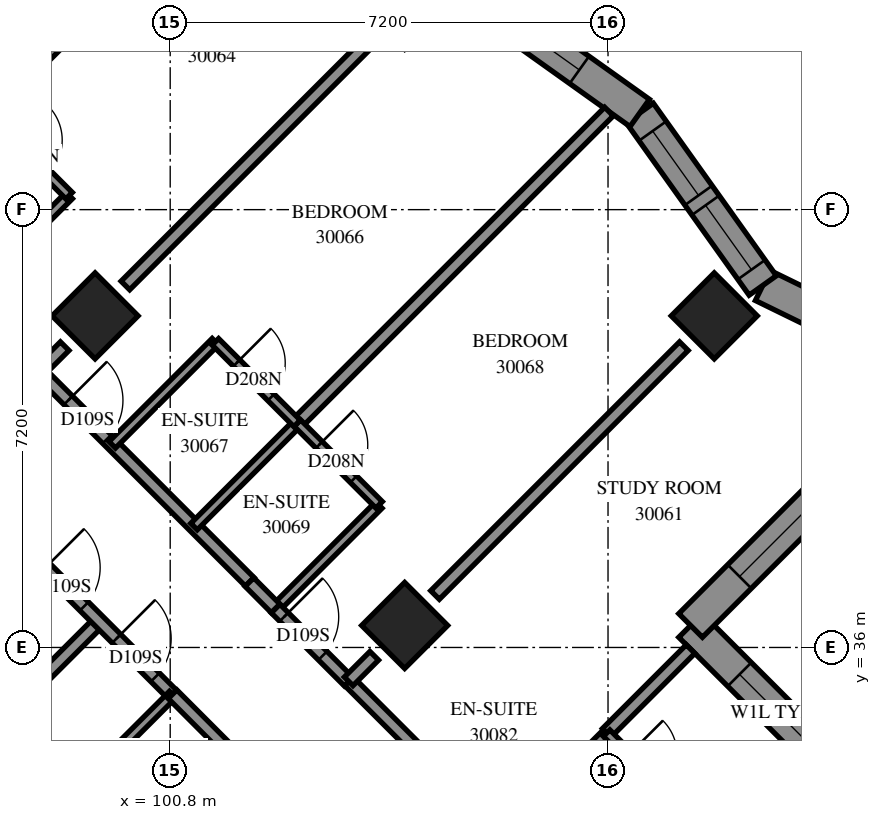
"""IFC4 building model, lengths in metres.
Left out: names, types, materials, properties, quantities, classifications, styles, units other than length and angle.
Written with IfcOpenShell. Run it as: python <this file> out.ifc"""

import sys

from ifc_helpers import new_model, si_unit, direction, frame, frame_2d, origin, origin_2d, place, context, subcontext, project, spatial, polyline, rectangle, outline, extrude, element, fill, save


model = new_model("IFC4")
c1 = context("Model", 3, precision=1e-05, world=origin(), true_north=direction((0.0, 1.0)))
c2 = subcontext(c1, "Body", "Model", "MODEL_VIEW")
j1 = project(units=[si_unit("LENGTHUNIT", "METRE"), si_unit("PLANEANGLEUNIT", "RADIAN")], contexts=[c1])
p1 = place(None, origin())
s1 = spatial("IfcSite", under=j1, at=p1, CompositionType="ELEMENT")
p2 = place(p1, origin())
s2 = spatial("IfcBuilding", under=s1, at=p2, CompositionType="ELEMENT")
p3 = place(p2, frame((0.0, 0.0, 111.8)))
s3 = spatial("IfcBuildingStorey", under=s2, at=p3, CompositionType="ELEMENT", Elevation=111.8)
for number, where, z_axis, x_axis in (
    (1, (99.565, 41.453, 0.0), (0.0, 0.0, 1.0), (0.707, -0.707, 0.0)),
    (2, (109.747, 41.453, 0.0), (0.0, 0.0, 1.0), (0.707, -0.707, 0.0)),
    (3, (104.656, 36.362, 0.0), (0.0, 0.0, 1.0), (0.707, -0.707, 0.0)),
):
    element("IfcColumn", number, at=place(p3, frame(where, z_axis=z_axis, x_axis=x_axis)), inside=s3, PredefinedType="COLUMN", context=c2, shape_type="SweptSolid", body=[
        extrude(rectangle(XDim=1.0, YDim=1.0, at=origin_2d()), origin(), (0.0, 0.0, 1.0), 3.1),
    ])
p4 = place(p3, frame((112.823, 32.897, 0.0), z_axis=(0.0, 0.0, 1.0), x_axis=(-0.7071067812, 0.7071067812, 0.0)))
e4 = element("IfcWall", 4, at=p4, inside=s3, PredefinedType="SOLIDWALL", context=c2, shape_type="SweptSolid", body=[
    extrude(outline(polyline([(-0.174, -0.275), (4.626, -0.275), (5.176, 0.275), (0.174, 0.275), (-0.174, -0.275)])), origin(), (0.0, 0.0, 1.0), 3.1),
])
p5 = place(p4, frame((1.963, 0.0, 0.6)))
e5 = element("IfcOpeningElement", 5, at=p5, cuts=e4, PredefinedType="OPENING", context=c2, shape_type="SweptSolid", body=[
    extrude(rectangle(XDim=1.8, YDim=1.9, at=frame_2d((0.9, 0.95))), frame((0.0, 0.285, 0.0), z_axis=(0.0, -1.0, 0.0), x_axis=(1.0, 0.0, 0.0)), (0.0, 0.0, 1.0), 0.57),
])
p6 = place(p3, frame((109.358, 36.362, 0.0), z_axis=(0.0, 0.0, 1.0), x_axis=(0.7071067812, 0.7071067812, 0.0)))
e6 = element("IfcWall", 6, at=p6, inside=s3, PredefinedType="SOLIDWALL", context=c2, shape_type="SweptSolid", body=[
    extrude(outline(polyline([(0.275, -0.275), (6.247, -0.275), (5.477, 0.275), (-0.275, 0.275), (0.275, -0.275)])), origin(), (0.0, 0.0, 1.0), 3.1),
])
p7 = place(p6, frame((1.137, 0.0, 0.6)))
e7 = element("IfcOpeningElement", 7, at=p7, cuts=e6, PredefinedType="OPENING", context=c2, shape_type="SweptSolid", body=[
    extrude(rectangle(XDim=1.8, YDim=1.9, at=frame_2d((0.9, 0.95))), frame((0.0, 0.285, 0.0), z_axis=(0.0, -1.0, 0.0), x_axis=(1.0, 0.0, 0.0)), (0.0, 0.0, 1.0), 0.57),
])
p8 = place(p6, frame((3.976, 0.0, 0.6)))
e8 = element("IfcOpeningElement", 8, at=p8, cuts=e6, PredefinedType="OPENING", context=c2, shape_type="SweptSolid", body=[
    extrude(rectangle(XDim=1.2, YDim=1.9, at=frame_2d((0.6, 0.95))), frame((0.0, 0.285, 0.0), z_axis=(0.0, -1.0, 0.0), x_axis=(1.0, 0.0, 0.0)), (0.0, 0.0, 1.0), 0.57),
])
p9 = place(p3, frame((113.503, 40.507, 0.0), z_axis=(0.0, 0.0, 1.0), x_axis=(-0.8984293541, 0.4391180887, 0.0)))
e9 = element("IfcWall", 9, at=p9, inside=s3, PredefinedType="SOLIDWALL", context=c2, shape_type="SweptSolid", body=[
    extrude(outline(polyline([(-0.385, -0.275), (3.224, -0.275), (3.363, 0.275), (0.385, 0.275), (-0.385, -0.275)])), origin(), (0.0, 0.0, 1.0), 3.1),
])
p10 = place(p9, frame((1.239, 0.0, 0.5)))
e10 = element("IfcOpeningElement", 10, at=p10, cuts=e9, PredefinedType="OPENING", context=c2, shape_type="SweptSolid", body=[
    extrude(rectangle(XDim=1.2, YDim=2.45, at=frame_2d((0.6, 1.225))), frame((0.0, 0.285, 0.0), z_axis=(0.0, -1.0, 0.0), x_axis=(1.0, 0.0, 0.0)), (0.0, 0.0, 1.0), 0.57),
])
p11 = place(p3, frame((110.544, 41.953, 0.0), z_axis=(0.0, 0.0, 1.0), x_axis=(-0.5805022438, 0.8142586474, 0.0)))
e11 = element("IfcWall", 11, at=p11, inside=s3, PredefinedType="SOLIDWALL", context=c2, shape_type="SweptSolid", body=[
    extrude(outline(polyline([(0.07, -0.275), (3.53, -0.275), (3.438, 0.275), (-0.07, 0.275), (0.07, -0.275)])), origin(), (0.0, 0.0, 1.0), 3.1),
])
p12 = place(p11, frame((0.319, 0.0, 0.5)))
e12 = element("IfcOpeningElement", 12, at=p12, cuts=e11, PredefinedType="OPENING", context=c2, shape_type="SweptSolid", body=[
    extrude(rectangle(XDim=1.3, YDim=2.45, at=frame_2d((0.65, 1.225))), frame((0.0, 0.285, 0.0), z_axis=(0.0, -1.0, 0.0), x_axis=(1.0, 0.0, 0.0)), (0.0, 0.0, 1.0), 0.57),
])
p13 = place(p11, frame((1.819, 0.0, 0.5)))
e13 = element("IfcOpeningElement", 13, at=p13, cuts=e11, PredefinedType="OPENING", context=c2, shape_type="SweptSolid", body=[
    extrude(rectangle(XDim=1.3, YDim=2.45, at=frame_2d((0.65, 1.225))), frame((0.0, 0.285, 0.0), z_axis=(0.0, -1.0, 0.0), x_axis=(1.0, 0.0, 0.0)), (0.0, 0.0, 1.0), 0.57),
])
p14 = place(p3, frame((108.522, 44.79, 0.0), z_axis=(0.0, 0.0, 1.0), x_axis=(-0.8142544581, 0.5805081201, 0.0)))
e14 = element("IfcWall", 14, at=p14, inside=s3, PredefinedType="SOLIDWALL", context=c2, shape_type="SweptSolid", body=[
    extrude(outline(polyline([(-0.046, -0.275), (3.414, -0.275), (3.507, 0.275), (0.046, 0.275), (-0.046, -0.275)])), origin(), (0.0, 0.0, 1.0), 3.1),
])
p15 = place(p14, frame((1.22, 0.0, 0.5)))
e15 = element("IfcOpeningElement", 15, at=p15, cuts=e14, PredefinedType="OPENING", context=c2, shape_type="SweptSolid", body=[
    extrude(rectangle(XDim=1.2, YDim=2.45, at=frame_2d((0.6, 1.225))), frame((0.0, 0.285, 0.0), z_axis=(0.0, -1.0, 0.0), x_axis=(1.0, 0.0, 0.0)), (0.0, 0.0, 1.0), 0.57),
])
p16 = place(p3, frame((91.452, 28.25, 0.0), z_axis=(0.0, 0.0, 1.0), x_axis=(0.7071931897, 0.7070203621, 0.0)))
e16 = element("IfcWall", 16, at=p16, inside=s3, PredefinedType="PARTITIONING", context=c2, shape_type="SweptSolid", body=[
    extrude(rectangle(XDim=11.572, YDim=0.2, at=frame_2d((5.786, 0.0))), origin(), (0.0, 0.0, 1.0), 3.1),
])
p17 = place(p3, frame((94.047, 42.015, 0.0), z_axis=(0.0, 0.0, 1.0), x_axis=(0.7071067812, -0.7071067812, 0.0)))
e17 = element("IfcWall", 17, at=p17, inside=s3, PredefinedType="PARTITIONING", context=c2, shape_type="SweptSolid", body=[
    extrude(rectangle(XDim=9.6, YDim=0.2, at=frame_2d((4.8, 0.0))), origin(), (0.0, 0.0, 1.0), 3.1),
])
p18 = place(p17, frame((1.099, 0.0, 0.0)))
e18 = element("IfcOpeningElement", 18, at=p18, cuts=e17, PredefinedType="OPENING", context=c2, shape_type="SweptSolid", body=[
    extrude(rectangle(XDim=0.9, YDim=2.1, at=frame_2d((0.45, 1.05))), frame((0.0, 0.11, 0.0), z_axis=(0.0, -1.0, 0.0), x_axis=(1.0, 0.0, 0.0)), (0.0, 0.0, 1.0), 0.22),
])
p19 = place(p17, frame((6.649, 0.0, 0.0)))
e19 = element("IfcOpeningElement", 19, at=p19, cuts=e17, PredefinedType="OPENING", context=c2, shape_type="SweptSolid", body=[
    extrude(rectangle(XDim=0.9, YDim=2.1, at=frame_2d((0.45, 1.05))), frame((0.0, 0.11, 0.0), z_axis=(0.0, -1.0, 0.0), x_axis=(1.0, 0.0, 0.0)), (0.0, 0.0, 1.0), 0.22),
])
p20 = place(p17, frame((8.3, 0.0, 0.0)))
e20 = element("IfcOpeningElement", 20, at=p20, cuts=e17, PredefinedType="OPENING", context=c2, shape_type="SweptSolid", body=[
    extrude(rectangle(XDim=0.9, YDim=2.1, at=frame_2d((0.45, 1.05))), frame((0.0, 0.11, 0.0), z_axis=(0.0, -1.0, 0.0), x_axis=(1.0, 0.0, 0.0)), (0.0, 0.0, 1.0), 0.22),
])
p21 = place(p3, frame((96.103, 43.083, 0.0), z_axis=(0.0, 0.0, 1.0), x_axis=(0.7071067812, -0.7071067812, 0.0)))
e21 = element("IfcWall", 21, at=p21, inside=s3, PredefinedType="PARTITIONING", context=c2, shape_type="SweptSolid", body=[
    extrude(rectangle(XDim=8.491, YDim=0.2, at=frame_2d((4.245, 0.0))), origin(), (0.0, 0.0, 1.0), 3.1),
])
p22 = place(p21, frame((1.995, 0.0, 0.0)))
e22 = element("IfcOpeningElement", 22, at=p22, cuts=e21, PredefinedType="OPENING", context=c2, shape_type="SweptSolid", body=[
    extrude(rectangle(XDim=0.9, YDim=2.1, at=frame_2d((0.45, 1.05))), frame((0.0, 0.11, 0.0), z_axis=(0.0, -1.0, 0.0), x_axis=(1.0, 0.0, 0.0)), (0.0, 0.0, 1.0), 0.22),
])
p23 = place(p21, frame((4.27, 0.0, 0.0)))
e23 = element("IfcOpeningElement", 23, at=p23, cuts=e21, PredefinedType="OPENING", context=c2, shape_type="SweptSolid", body=[
    extrude(rectangle(XDim=0.9, YDim=2.1, at=frame_2d((0.45, 1.05))), frame((0.0, 0.11, 0.0), z_axis=(0.0, -1.0, 0.0), x_axis=(1.0, 0.0, 0.0)), (0.0, 0.0, 1.0), 0.22),
])
p24 = place(p3, frame((95.606, 43.577, 0.0), z_axis=(0.0, 0.0, 1.0), x_axis=(0.7071067812, 0.7071067812, 0.0)))
e24 = element("IfcWall", 24, at=p24, inside=s3, PredefinedType="PARTITIONING", context=c2, shape_type="SweptSolid", body=[
    extrude(rectangle(XDim=7.798, YDim=0.2, at=frame_2d((3.899, 0.0))), origin(), (0.0, 0.0, 1.0), 3.1),
])
p25 = place(p3, frame((102.888, 39.687, 0.0), z_axis=(0.0, 0.0, 1.0), x_axis=(0.7072515706, 0.7069619621, 0.0)))
e25 = element("IfcWall", 25, at=p25, inside=s3, PredefinedType="PARTITIONING", context=c2, shape_type="SweptSolid", body=[
    extrude(rectangle(XDim=7.251, YDim=0.2, at=frame_2d((3.626, 0.0))), origin(), (0.0, 0.0, 1.0), 3.1),
])
p26 = place(p3, frame((108.831, 30.355, 0.0), z_axis=(0.0, 0.0, 1.0), x_axis=(-0.7073012053, 0.7069123036, 0.0)))
e26 = element("IfcWall", 26, at=p26, inside=s3, PredefinedType="PARTITIONING", context=c2, shape_type="SweptSolid", body=[
    extrude(rectangle(XDim=7.2, YDim=0.2, at=frame_2d((3.6, 0.0))), origin(), (0.0, 0.0, 1.0), 3.1),
])
p27 = place(p26, frame((4.125, 0.0, 0.0)))
e27 = element("IfcOpeningElement", 27, at=p27, cuts=e26, PredefinedType="OPENING", context=c2, shape_type="SweptSolid", body=[
    extrude(rectangle(XDim=1.0, YDim=2.1, at=frame_2d((0.5, 1.05))), frame((0.0, 0.11, 0.0), z_axis=(0.0, -1.0, 0.0), x_axis=(1.0, 0.0, 0.0)), (0.0, 0.0, 1.0), 0.22),
])
p28 = place(p26, frame((0.705, 0.0, 0.0)))
e28 = element("IfcOpeningElement", 28, at=p28, cuts=e26, PredefinedType="OPENING", context=c2, shape_type="SweptSolid", body=[
    extrude(rectangle(XDim=0.9, YDim=2.1, at=frame_2d((0.45, 1.05))), frame((0.0, 0.11, 0.0), z_axis=(0.0, -1.0, 0.0), x_axis=(1.0, 0.0, 0.0)), (0.0, 0.0, 1.0), 0.22),
])
p29 = place(p3, frame((97.795, 44.777, 0.0), z_axis=(0.0, 0.0, 1.0), x_axis=(0.7071137356, 0.7070998267, 0.0)))
e29 = element("IfcWall", 29, at=p29, inside=s3, PredefinedType="PARTITIONING", context=c2, shape_type="SweptSolid", body=[
    extrude(rectangle(XDim=7.19, YDim=0.2, at=frame_2d((3.595, 0.0))), origin(), (0.0, 0.0, 1.0), 3.1),
])
for number, where, z_axis, x_axis in (
    (30, (105.155, 36.863, 0.0), (0.0, 0.0, 1.0), (0.707, 0.707, 0.0)),
    (31, (100.063, 41.953, 0.0), (0.0, 0.0, 1.0), (0.707, 0.707, 0.0)),
):
    element("IfcWall", number, at=place(p3, frame(where, z_axis=z_axis, x_axis=x_axis)), inside=s3, PredefinedType="PARTITIONING", context=c2, shape_type="SweptSolid", body=[
        extrude(rectangle(XDim=5.787, YDim=0.2, at=frame_2d((2.893, 0.0))), origin(), (0.0, 0.0, 1.0), 3.1),
    ])
p30 = place(p3, frame((102.533, 36.645, 0.0), z_axis=(0.0, 0.0, 1.0), x_axis=(0.7071067812, 0.7071067812, 0.0)))
e32 = element("IfcWall", 32, at=p30, inside=s3, PredefinedType="PARTITIONING", context=c2, shape_type="SweptSolid", body=[
    extrude(rectangle(XDim=2.401, YDim=0.15, at=frame_2d((1.201, 0.0))), origin(), (0.0, 0.0, 1.0), 3.1),
])
for number, where, z_axis, x_axis in (
    (33, (101.192, 37.988, 0.0), (0.0, 0.0, 1.0), (0.707, 0.708, 0.0)),
    (34, (99.143, 33.531, 0.0), (0.0, 0.0, 1.0), (0.708, 0.707, 0.0)),
):
    element("IfcWall", number, at=place(p3, frame(where, z_axis=z_axis, x_axis=x_axis)), inside=s3, PredefinedType="PARTITIONING", context=c2, shape_type="SweptSolid", body=[
        extrude(rectangle(XDim=2.4, YDim=0.15, at=frame_2d((1.2, 0.0))), origin(), (0.0, 0.0, 1.0), 3.1),
    ])
for number, where, z_axis, x_axis in (
    (35, (97.443, 41.737, 0.0), (0.0, 0.0, 1.0), (0.707, 0.707, 0.0)),
    (36, (106.283, 32.899, 0.0), (0.0, 0.0, 1.0), (0.707, 0.707, 0.0)),
    (37, (99.847, 39.333, 0.0), (0.0, 0.0, 1.0), (0.707, 0.707, 0.0)),
):
    element("IfcWall", number, at=place(p3, frame(where, z_axis=z_axis, x_axis=x_axis)), inside=s3, PredefinedType="PARTITIONING", context=c2, shape_type="SweptSolid", body=[
        extrude(rectangle(XDim=2.398, YDim=0.15, at=frame_2d((1.199, 0.0))), origin(), (0.0, 0.0, 1.0), 3.1),
    ])
p31 = place(p3, frame((97.793, 44.773, 0.0), z_axis=(0.0, 0.0, 1.0), x_axis=(0.7071067812, -0.7071067812, 0.0)))
e38 = element("IfcWall", 38, at=p31, inside=s3, PredefinedType="PARTITIONING", context=c2, shape_type="SweptSolid", body=[
    extrude(rectangle(XDim=1.901, YDim=0.15, at=frame_2d((0.95, 0.0))), origin(), (0.0, 0.0, 1.0), 3.1),
])
p32 = place(p31, frame((0.609, 0.0, 0.0)))
e39 = element("IfcOpeningElement", 39, at=p32, cuts=e38, PredefinedType="OPENING", context=c2, shape_type="SweptSolid", body=[
    extrude(rectangle(XDim=0.8, YDim=2.1, at=frame_2d((0.4, 1.05))), frame((0.0, 0.085, 0.0), z_axis=(0.0, -1.0, 0.0), x_axis=(1.0, 0.0, 0.0)), (0.0, 0.0, 1.0), 0.17),
])
p33 = place(p3, frame((102.891, 39.69, 0.0), z_axis=(0.0, 0.0, 1.0), x_axis=(0.7071067812, -0.7071067812, 0.0)))
e40 = element("IfcWall", 40, at=p33, inside=s3, PredefinedType="PARTITIONING", context=c2, shape_type="SweptSolid", body=[
    extrude(rectangle(XDim=1.901, YDim=0.15, at=frame_2d((0.95, 0.0))), origin(), (0.0, 0.0, 1.0), 3.1),
])
p34 = place(p33, frame((0.505, 0.0, 0.0)))
e41 = element("IfcOpeningElement", 41, at=p34, cuts=e40, PredefinedType="OPENING", context=c2, shape_type="SweptSolid", body=[
    extrude(rectangle(XDim=0.8, YDim=2.1, at=frame_2d((0.4, 1.05))), frame((0.0, 0.085, 0.0), z_axis=(0.0, -1.0, 0.0), x_axis=(1.0, 0.0, 0.0)), (0.0, 0.0, 1.0), 0.17),
])
p35 = place(p3, frame((107.979, 34.595, 0.0), z_axis=(0.0, 0.0, 1.0), x_axis=(0.7071067812, 0.7071067812, 0.0)))
e42 = element("IfcWall", 42, at=p35, inside=s3, PredefinedType="PARTITIONING", context=c2, shape_type="SweptSolid", body=[
    extrude(rectangle(XDim=1.95, YDim=0.2, at=frame_2d((0.975, 0.0))), origin(), (0.0, 0.0, 1.0), 3.1),
])
p36 = place(p3, frame((100.839, 35.231, 0.0), z_axis=(0.0, 0.0, 1.0), x_axis=(0.7065800724, -0.7076330979, 0.0)))
e43 = element("IfcWall", 43, at=p36, inside=s3, PredefinedType="PARTITIONING", context=c2, shape_type="SweptSolid", body=[
    extrude(rectangle(XDim=1.899, YDim=0.2, at=frame_2d((0.95, 0.0))), origin(), (0.0, 0.0, 1.0), 3.1),
])
p37 = place(p3, frame((107.977, 34.591, 0.0), z_axis=(0.0, 0.0, 1.0), x_axis=(0.7065800724, -0.7076330979, 0.0)))
e44 = element("IfcWall", 44, at=p37, inside=s3, PredefinedType="PARTITIONING", context=c2, shape_type="SweptSolid", body=[
    extrude(rectangle(XDim=1.899, YDim=0.15, at=frame_2d((0.95, 0.0))), origin(), (0.0, 0.0, 1.0), 3.1),
])
p38 = place(p37, frame((0.508, 0.0, 0.0)))
e45 = element("IfcOpeningElement", 45, at=p38, cuts=e44, PredefinedType="OPENING", context=c2, shape_type="SweptSolid", body=[
    extrude(rectangle(XDim=0.8, YDim=2.1, at=frame_2d((0.4, 1.05))), frame((0.0, 0.085, 0.0), z_axis=(0.0, -1.0, 0.0), x_axis=(1.0, 0.0, 0.0)), (0.0, 0.0, 1.0), 0.17),
])
p39 = place(p3, frame((101.543, 41.027, 0.0), z_axis=(0.0, 0.0, 1.0), x_axis=(0.7076330979, -0.7065800724, 0.0)))
e46 = element("IfcWall", 46, at=p39, inside=s3, PredefinedType="PARTITIONING", context=c2, shape_type="SweptSolid", body=[
    extrude(rectangle(XDim=1.899, YDim=0.15, at=frame_2d((0.95, 0.0))), origin(), (0.0, 0.0, 1.0), 3.1),
])
p40 = place(p39, frame((0.493, 0.0, 0.0)))
e47 = element("IfcOpeningElement", 47, at=p40, cuts=e46, PredefinedType="OPENING", context=c2, shape_type="SweptSolid", body=[
    extrude(rectangle(XDim=0.8, YDim=2.1, at=frame_2d((0.4, 1.05))), frame((0.0, 0.085, 0.0), z_axis=(0.0, -1.0, 0.0), x_axis=(1.0, 0.0, 0.0)), (0.0, 0.0, 1.0), 0.17),
])
p41 = place(p3, frame((102.531, 36.641, 0.0), z_axis=(0.0, 0.0, 1.0), x_axis=(0.7071067812, -0.7071067812, 0.0)))
e48 = element("IfcWall", 48, at=p41, inside=s3, PredefinedType="PARTITIONING", context=c2, shape_type="SweptSolid", body=[
    extrude(rectangle(XDim=1.7, YDim=0.2, at=frame_2d((0.85, 0.0))), origin(), (0.0, 0.0, 1.0), 3.1),
])
p42 = place(p41, frame((0.198, 0.0, 0.0)))
e49 = element("IfcOpeningElement", 49, at=p42, cuts=e48, PredefinedType="OPENING", context=c2, shape_type="SweptSolid", body=[
    extrude(rectangle(XDim=0.9, YDim=2.1, at=frame_2d((0.45, 1.05))), frame((0.0, 0.11, 0.0), z_axis=(0.0, -1.0, 0.0), x_axis=(1.0, 0.0, 0.0)), (0.0, 0.0, 1.0), 0.22),
])
p43 = place(p3, frame((102.103, 37.075, 0.0), z_axis=(0.0, 0.0, 1.0), x_axis=(0.7054642634, -0.7087454925, 0.0)))
e50 = element("IfcWall", 50, at=p43, inside=s3, PredefinedType="PARTITIONING", context=c2, shape_type="SweptSolid", body=[
    extrude(rectangle(XDim=0.61, YDim=0.2, at=frame_2d((0.305, 0.0))), origin(), (0.0, 0.0, 1.0), 3.1),
])
for number, where, z_axis, x_axis in (
    (51, (98.645, 40.535, 0.0), (0.0, 0.0, 1.0), (0.707, 0.707, 0.0)),
    (52, (103.735, 35.443, 0.0), (0.0, 0.0, 1.0), (0.707, 0.707, 0.0)),
):
    element("IfcWall", number, at=place(p3, frame(where, z_axis=z_axis, x_axis=x_axis)), inside=s3, PredefinedType="PARTITIONING", context=c2, shape_type="SweptSolid", body=[
        extrude(rectangle(XDim=0.594, YDim=0.2, at=frame_2d((0.297, 0.0))), origin(), (0.0, 0.0, 1.0), 3.1),
    ])
p44 = place(p5, origin())
e53 = element("IfcWindow", 53, at=p44, inside=s3, PartitioningType="SINGLE_PANEL", PredefinedType="WINDOW", context=c2, shape_type="SweptSolid", body=[
    extrude(rectangle(XDim=1.8, YDim=1.9, at=frame_2d((0.9, 0.95))), frame((0.0, 0.155, 0.0), z_axis=(0.0, -1.0, 0.0), x_axis=(1.0, 0.0, 0.0)), (0.0, 0.0, 1.0), 0.06),
])
fill(e5, e53)
p45 = place(p7, origin())
e54 = element("IfcWindow", 54, at=p45, inside=s3, PartitioningType="SINGLE_PANEL", PredefinedType="WINDOW", context=c2, shape_type="SweptSolid", body=[
    extrude(rectangle(XDim=1.8, YDim=1.9, at=frame_2d((0.9, 0.95))), frame((0.0, 0.155, 0.0), z_axis=(0.0, -1.0, 0.0), x_axis=(1.0, 0.0, 0.0)), (0.0, 0.0, 1.0), 0.06),
])
fill(e7, e54)
p46 = place(p12, origin())
e55 = element("IfcWindow", 55, at=p46, inside=s3, PartitioningType="SINGLE_PANEL", PredefinedType="WINDOW", context=c2, shape_type="SweptSolid", body=[
    extrude(rectangle(XDim=1.3, YDim=2.45, at=frame_2d((0.65, 1.225))), frame((0.0, 0.155, 0.0), z_axis=(0.0, -1.0, 0.0), x_axis=(1.0, 0.0, 0.0)), (0.0, 0.0, 1.0), 0.06),
])
fill(e12, e55)
p47 = place(p13, origin())
e56 = element("IfcWindow", 56, at=p47, inside=s3, PartitioningType="SINGLE_PANEL", PredefinedType="WINDOW", context=c2, shape_type="SweptSolid", body=[
    extrude(rectangle(XDim=1.3, YDim=2.45, at=frame_2d((0.65, 1.225))), frame((0.0, 0.155, 0.0), z_axis=(0.0, -1.0, 0.0), x_axis=(1.0, 0.0, 0.0)), (0.0, 0.0, 1.0), 0.06),
])
fill(e13, e56)
p48 = place(p15, origin())
e57 = element("IfcWindow", 57, at=p48, inside=s3, PartitioningType="SINGLE_PANEL", PredefinedType="WINDOW", context=c2, shape_type="SweptSolid", body=[
    extrude(rectangle(XDim=1.2, YDim=2.45, at=frame_2d((0.6, 1.225))), frame((0.0, 0.155, 0.0), z_axis=(0.0, -1.0, 0.0), x_axis=(1.0, 0.0, 0.0)), (0.0, 0.0, 1.0), 0.06),
])
fill(e15, e57)
p49 = place(p23, origin())
e58 = element("IfcDoor", 58, at=p49, inside=s3, OperationType="SINGLE_SWING_LEFT", PredefinedType="DOOR", context=c2, shape_type="SweptSolid", body=[
    extrude(rectangle(XDim=0.9, YDim=2.1, at=frame_2d((0.45, 1.05))), frame((0.0, 0.025, 0.0), z_axis=(0.0, -1.0, 0.0), x_axis=(1.0, 0.0, 0.0)), (0.0, 0.0, 1.0), 0.05),
])
fill(e23, e58)
p50 = place(p40, origin())
e59 = element("IfcDoor", 59, at=p50, inside=s3, OperationType="SINGLE_SWING_RIGHT", PredefinedType="DOOR", context=c2, shape_type="SweptSolid", body=[
    extrude(rectangle(XDim=0.8, YDim=2.1, at=frame_2d((0.4, 1.05))), frame((0.0, 0.025, 0.0), z_axis=(0.0, -1.0, 0.0), x_axis=(1.0, 0.0, 0.0)), (0.0, 0.0, 1.0), 0.05),
])
fill(e47, e59)
p51 = place(p42, origin())
e60 = element("IfcDoor", 60, at=p51, inside=s3, OperationType="SINGLE_SWING_RIGHT", PredefinedType="DOOR", context=c2, shape_type="SweptSolid", body=[
    extrude(rectangle(XDim=0.9, YDim=2.1, at=frame_2d((0.45, 1.05))), frame((0.0, 0.025, 0.0), z_axis=(0.0, -1.0, 0.0), x_axis=(1.0, 0.0, 0.0)), (0.0, 0.0, 1.0), 0.05),
])
fill(e49, e60)
p52 = place(p34, origin())
e61 = element("IfcDoor", 61, at=p52, inside=s3, OperationType="SINGLE_SWING_RIGHT", PredefinedType="DOOR", context=c2, shape_type="SweptSolid", body=[
    extrude(rectangle(XDim=0.8, YDim=2.1, at=frame_2d((0.4, 1.05))), frame((0.0, 0.025, 0.0), z_axis=(0.0, -1.0, 0.0), x_axis=(1.0, 0.0, 0.0)), (0.0, 0.0, 1.0), 0.05),
])
fill(e41, e61)
p53 = place(p19, origin())
e62 = element("IfcDoor", 62, at=p53, inside=s3, OperationType="SINGLE_SWING_RIGHT", PredefinedType="DOOR", context=c2, shape_type="SweptSolid", body=[
    extrude(rectangle(XDim=0.9, YDim=2.1, at=frame_2d((0.45, 1.05))), frame((0.0, 0.025, 0.0), z_axis=(0.0, -1.0, 0.0), x_axis=(1.0, 0.0, 0.0)), (0.0, 0.0, 1.0), 0.05),
])
fill(e19, e62)
p54 = place(p20, origin())
e63 = element("IfcDoor", 63, at=p54, inside=s3, OperationType="SINGLE_SWING_LEFT", PredefinedType="DOOR", context=c2, shape_type="SweptSolid", body=[
    extrude(rectangle(XDim=0.9, YDim=2.1, at=frame_2d((0.45, 1.05))), frame((0.0, 0.025, 0.0), z_axis=(0.0, -1.0, 0.0), x_axis=(1.0, 0.0, 0.0)), (0.0, 0.0, 1.0), 0.05),
])
fill(e20, e63)
save(model, sys.argv[1])
